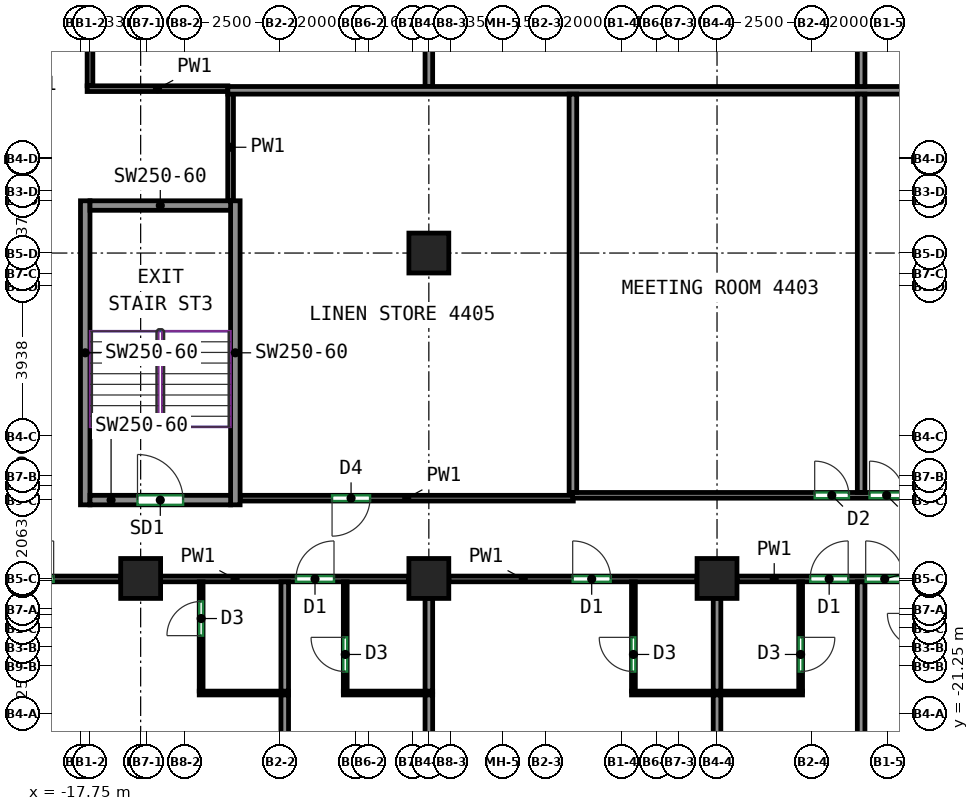
"""IFC4 building model, lengths in metres.
Left out: names, types, materials, properties, quantities, classifications, styles, units other than length and angle.
Written with IfcOpenShell. Run it as: python <this file> out.ifc"""

import sys

from ifc_helpers import new_model, si_unit, direction, frame, frame_2d, origin, origin_2d, place, context, subcontext, project, spatial, rectangle, extrude, source, transform, mapped, element, fill, save


model = new_model("IFC4")
c1 = context("Model", 3, precision=1e-05, world=origin(), true_north=direction((0.0, 1.0)))
c2 = subcontext(c1, "Body", "Model", "MODEL_VIEW")
j1 = project(units=[si_unit("LENGTHUNIT", "METRE"), si_unit("PLANEANGLEUNIT", "RADIAN")], contexts=[c1])
p1 = place(None, origin())
s1 = spatial("IfcSite", under=j1, at=p1, CompositionType="ELEMENT")
p2 = place(p1, origin())
s2 = spatial("IfcBuilding", under=s1, at=p2, CompositionType="ELEMENT")
p3 = place(p2, frame((0.0, 0.0, 185.5)))
s3 = spatial("IfcBuildingStorey", under=s2, at=p3, CompositionType="ELEMENT", Elevation=185.5)
m1 = source(origin(), c2, "Body", "SweptSolid", [
    extrude(rectangle(XDim=1.05, YDim=1.05, at=origin_2d()), origin(), (0.0, 0.0, 1.0), 3.12),
])
for number, where, z_axis, x_axis in (
    (1, (-16.167, -17.688, 0.0), (0.0, 0.0, 1.0), (1.0, 0.0, 0.0)),
    (2, (-8.583, -17.688, 0.0), (0.0, 0.0, 1.0), (1.0, 0.0, 0.0)),
    (3, (-8.583, -9.125, 0.0), (0.0, 0.0, 1.0), (1.0, 0.0, 0.0)),
    (4, (-1.0, -17.688, 0.0), (0.0, 0.0, 1.0), (1.0, 0.0, 0.0)),
):
    element("IfcColumn", number, at=place(p3, frame(where, z_axis=z_axis, x_axis=x_axis)), inside=s3, PredefinedType="COLUMN", context=c2, shape_type="MappedRepresentation", body=[
        mapped(m1, transform((0.0, 0.0, 0.0))),
    ])
m2 = source(origin(), c2, "Body", "SweptSolid", [
    extrude(rectangle(XDim=8.0, YDim=0.25, at=frame_2d((4.0, 0.0))), origin(), (0.0, 0.0, 1.0), 3.12),
])
for number, where, z_axis, x_axis in (
    (5, (-17.625, -15.75, 0.0), (0.0, 0.0, 1.0), (0.0, 1.0, 0.0)),
    (6, (-13.675, -15.75, 0.0), (0.0, 0.0, 1.0), (0.0, 1.0, 0.0)),
):
    element("IfcWall", number, at=place(p3, frame(where, z_axis=z_axis, x_axis=x_axis)), inside=s3, PredefinedType="SHEAR", context=c2, shape_type="MappedRepresentation", body=[
        mapped(m2, transform((0.0, 0.0, 0.0))),
    ])
m3 = source(origin(), c2, "Body", "SweptSolid", [
    extrude(rectangle(XDim=3.7, YDim=0.25, at=frame_2d((1.85, 0.0))), origin(), (0.0, 0.0, 1.0), 3.12),
])
p4 = place(p3, frame((-17.5, -15.625, 0.0), z_axis=(0.0, 0.0, 1.0), x_axis=(1.0, 0.0, 0.0)))
e7 = element("IfcWall", 7, at=p4, inside=s3, PredefinedType="SHEAR", context=c2, shape_type="MappedRepresentation", body=[
    mapped(m3, transform((0.0, 0.0, 0.0))),
])
p5 = place(p4, frame((1.25, 0.0, 0.0)))
e8 = element("IfcOpeningElement", 8, at=p5, cuts=e7, PredefinedType="OPENING", context=c2, shape_type="SweptSolid", body=[
    extrude(rectangle(XDim=1.2, YDim=2.1, at=frame_2d((0.6, 1.05))), frame((0.0, 0.135, 0.0), z_axis=(0.0, -1.0, 0.0), x_axis=(1.0, 0.0, 0.0)), (0.0, 0.0, 1.0), 0.27),
])
p6 = place(p3, frame((-17.5, -7.875, 0.0), z_axis=(0.0, 0.0, 1.0), x_axis=(1.0, 0.0, 0.0)))
e9 = element("IfcWall", 9, at=p6, inside=s3, PredefinedType="SHEAR", context=c2, shape_type="MappedRepresentation", body=[
    mapped(m3, transform((0.0, 0.0, 0.0))),
])
p7 = place(p3, frame((-23.75, -17.7, 0.0), z_axis=(0.0, 0.0, 1.0), x_axis=(1.0, 0.0, 0.0)))
e10 = element("IfcWall", 10, at=p7, inside=s3, PredefinedType="PARTITIONING", context=c2, shape_type="SweptSolid", body=[
    extrude(rectangle(XDim=7.058, YDim=0.15, at=frame_2d((3.529, 0.0))), origin(), (0.0, 0.0, 1.0), 2.52),
])
p8 = place(p7, frame((0.401, 0.0, 0.0)))
e11 = element("IfcOpeningElement", 11, at=p8, cuts=e10, PredefinedType="OPENING", context=c2, shape_type="SweptSolid", body=[
    extrude(rectangle(XDim=1.0, YDim=2.1, at=frame_2d((0.5, 1.05))), frame((0.0, 0.085, 0.0), z_axis=(0.0, -1.0, 0.0), x_axis=(1.0, 0.0, 0.0)), (0.0, 0.0, 1.0), 0.17),
])
p9 = place(p7, frame((4.294, 0.0, 0.0)))
e12 = element("IfcOpeningElement", 12, at=p9, cuts=e10, PredefinedType="OPENING", context=c2, shape_type="SweptSolid", body=[
    extrude(rectangle(XDim=1.0, YDim=2.1, at=frame_2d((0.5, 1.05))), frame((0.0, 0.085, 0.0), z_axis=(0.0, -1.0, 0.0), x_axis=(1.0, 0.0, 0.0)), (0.0, 0.0, 1.0), 0.17),
])
p10 = place(p3, frame((-15.642, -17.7, 0.0), z_axis=(0.0, 0.0, 1.0), x_axis=(1.0, 0.0, 0.0)))
e13 = element("IfcWall", 13, at=p10, inside=s3, PredefinedType="PARTITIONING", context=c2, shape_type="SweptSolid", body=[
    extrude(rectangle(XDim=6.534, YDim=0.15, at=frame_2d((3.267, 0.0))), origin(), (0.0, 0.0, 1.0), 3.12),
])
p11 = place(p10, frame((3.563, 0.0, 0.0)))
e14 = element("IfcOpeningElement", 14, at=p11, cuts=e13, PredefinedType="OPENING", context=c2, shape_type="SweptSolid", body=[
    extrude(rectangle(XDim=1.0, YDim=2.1, at=frame_2d((0.5, 1.05))), frame((0.0, 0.085, 0.0), z_axis=(0.0, -1.0, 0.0), x_axis=(1.0, 0.0, 0.0)), (0.0, 0.0, 1.0), 0.17),
])
p12 = place(p3, frame((-8.058, -17.7, 0.0), z_axis=(0.0, 0.0, 1.0), x_axis=(1.0, 0.0, 0.0)))
e15 = element("IfcWall", 15, at=p12, inside=s3, PredefinedType="PARTITIONING", context=c2, shape_type="SweptSolid", body=[
    extrude(rectangle(XDim=6.533, YDim=0.15, at=frame_2d((3.267, 0.0))), origin(), (0.0, 0.0, 1.0), 3.12),
])
p13 = place(p12, frame((3.26, 0.0, 0.0)))
e16 = element("IfcOpeningElement", 16, at=p13, cuts=e15, PredefinedType="OPENING", context=c2, shape_type="SweptSolid", body=[
    extrude(rectangle(XDim=1.0, YDim=2.1, at=frame_2d((0.5, 1.05))), frame((0.0, 0.085, 0.0), z_axis=(0.0, -1.0, 0.0), x_axis=(1.0, 0.0, 0.0)), (0.0, 0.0, 1.0), 0.17),
])
p14 = place(p3, frame((-0.475, -17.7, 0.0), z_axis=(0.0, 0.0, 1.0), x_axis=(1.0, 0.0, 0.0)))
e17 = element("IfcWall", 17, at=p14, inside=s3, PredefinedType="PARTITIONING", context=c2, shape_type="SweptSolid", body=[
    extrude(rectangle(XDim=6.533, YDim=0.15, at=frame_2d((3.267, 0.0))), origin(), (0.0, 0.0, 1.0), 3.12),
])
p15 = place(p14, frame((1.926, 0.0, 0.0)))
e18 = element("IfcOpeningElement", 18, at=p15, cuts=e17, PredefinedType="OPENING", context=c2, shape_type="SweptSolid", body=[
    extrude(rectangle(XDim=1.0, YDim=2.1, at=frame_2d((0.5, 1.05))), frame((0.0, 0.085, 0.0), z_axis=(0.0, -1.0, 0.0), x_axis=(1.0, 0.0, 0.0)), (0.0, 0.0, 1.0), 0.17),
])
p16 = place(p14, frame((3.387, 0.0, 0.0)))
e19 = element("IfcOpeningElement", 19, at=p16, cuts=e17, PredefinedType="OPENING", context=c2, shape_type="SweptSolid", body=[
    extrude(rectangle(XDim=1.0, YDim=2.1, at=frame_2d((0.5, 1.05))), frame((0.0, 0.085, 0.0), z_axis=(0.0, -1.0, 0.0), x_axis=(1.0, 0.0, 0.0)), (0.0, 0.0, 1.0), 0.17),
])
p17 = place(p3, frame((-17.5, -4.725, 0.0), z_axis=(0.0, 0.0, 1.0), x_axis=(0.0, 1.0, 0.0)))
e20 = element("IfcWall", 20, at=p17, inside=s3, PredefinedType="PARTITIONING", context=c2, shape_type="SweptSolid", body=[
    extrude(rectangle(XDim=8.35, YDim=0.15, at=frame_2d((4.175, 0.0))), origin(), (0.0, 0.0, 1.0), 3.12),
])
p18 = place(p3, frame((-17.575, -4.8, 0.0), z_axis=(0.0, 0.0, 1.0), x_axis=(1.0, 0.0, 0.0)))
e21 = element("IfcWall", 21, at=p18, inside=s3, PredefinedType="PARTITIONING", context=c2, shape_type="SweptSolid", body=[
    extrude(rectangle(XDim=3.702, YDim=0.15, at=frame_2d((1.851, 0.0))), origin(), (0.0, 0.0, 1.0), 3.12),
])
p19 = place(p3, frame((-13.8, -7.75, 0.0), z_axis=(0.0, 0.0, 1.0), x_axis=(0.0, 1.0, 0.0)))
e22 = element("IfcWall", 22, at=p19, inside=s3, PredefinedType="PARTITIONING", context=c2, shape_type="SweptSolid", body=[
    extrude(rectangle(XDim=2.817, YDim=0.15, at=frame_2d((1.408, 0.0))), origin(), (0.0, 0.0, 1.0), 3.12),
])
p20 = place(p3, frame((-4.782, -15.575, 0.0), z_axis=(0.0, 0.0, 1.0), x_axis=(-1.0, 0.0, 0.0)))
e23 = element("IfcWall", 23, at=p20, inside=s3, PredefinedType="PARTITIONING", context=c2, shape_type="SweptSolid", body=[
    extrude(rectangle(XDim=8.768, YDim=0.15, at=frame_2d((4.384, 0.0))), origin(), (0.0, 0.0, 1.0), 3.12),
])
p21 = place(p20, frame((5.348, 0.0, 0.0)))
e24 = element("IfcOpeningElement", 24, at=p21, cuts=e23, PredefinedType="OPENING", context=c2, shape_type="SweptSolid", body=[
    extrude(rectangle(XDim=1.0, YDim=2.1, at=frame_2d((0.5, 1.05))), frame((0.0, 0.085, 0.0), z_axis=(0.0, -1.0, 0.0), x_axis=(1.0, 0.0, 0.0)), (0.0, 0.0, 1.0), 0.17),
])
p22 = place(p3, frame((-4.802, -15.5, 0.0), z_axis=(0.0, 0.0, 1.0), x_axis=(1.0, 0.0, 0.0)))
e25 = element("IfcWall", 25, at=p22, inside=s3, PredefinedType="PARTITIONING", context=c2, shape_type="SweptSolid", body=[
    extrude(rectangle(XDim=21.077, YDim=0.15, at=frame_2d((10.539, 0.0))), origin(), (0.0, 0.0, 1.0), 3.12),
])
p23 = place(p22, frame((6.372, 0.0, 0.0)))
e26 = element("IfcOpeningElement", 26, at=p23, cuts=e25, PredefinedType="OPENING", context=c2, shape_type="SweptSolid", body=[
    extrude(rectangle(XDim=0.9, YDim=2.1, at=frame_2d((0.45, 1.05))), frame((0.0, 0.085, 0.0), z_axis=(0.0, -1.0, 0.0), x_axis=(1.0, 0.0, 0.0)), (0.0, 0.0, 1.0), 0.17),
])
p24 = place(p22, frame((7.815, 0.0, 0.0)))
e27 = element("IfcOpeningElement", 27, at=p24, cuts=e25, PredefinedType="OPENING", context=c2, shape_type="SweptSolid", body=[
    extrude(rectangle(XDim=0.9, YDim=2.1, at=frame_2d((0.45, 1.05))), frame((0.0, 0.085, 0.0), z_axis=(0.0, -1.0, 0.0), x_axis=(1.0, 0.0, 0.0)), (0.0, 0.0, 1.0), 0.17),
])
p25 = place(p3, frame((-14.575, -20.652, 0.0), z_axis=(0.0, 0.0, 1.0), x_axis=(0.0, 1.0, 0.0)))
e28 = element("IfcWall", 28, at=p25, inside=s3, PredefinedType="PARTITIONING", context=c2, shape_type="SweptSolid", body=[
    extrude(rectangle(XDim=2.875, YDim=0.1, at=frame_2d((1.438, 0.0))), origin(), (0.0, 0.0, 1.0), 3.12),
])
p26 = place(p25, frame((1.46, 0.0, 0.0)))
e29 = element("IfcOpeningElement", 29, at=p26, cuts=e28, PredefinedType="OPENING", context=c2, shape_type="SweptSolid", body=[
    extrude(rectangle(XDim=0.9, YDim=2.1, at=frame_2d((0.45, 1.05))), frame((0.0, 0.06, 0.0), z_axis=(0.0, -1.0, 0.0), x_axis=(1.0, 0.0, 0.0)), (0.0, 0.0, 1.0), 0.12),
])
p27 = place(p3, frame((-14.625, -20.702, 0.0), z_axis=(0.0, 0.0, 1.0), x_axis=(1.0, 0.0, 0.0)))
e30 = element("IfcWall", 30, at=p27, inside=s3, PredefinedType="PARTITIONING", context=c2, shape_type="SweptSolid", body=[
    extrude(rectangle(XDim=2.35, YDim=0.1, at=frame_2d((1.175, 0.0))), origin(), (0.0, 0.0, 1.0), 3.12),
])
p28 = place(p3, frame((-12.375, -26.0, 0.0), z_axis=(0.0, 0.0, 1.0), x_axis=(0.0, 1.0, 0.0)))
e31 = element("IfcWall", 31, at=p28, inside=s3, PredefinedType="PARTITIONING", context=c2, shape_type="SweptSolid", body=[
    extrude(rectangle(XDim=5.248, YDim=0.2, at=frame_2d((2.624, 0.0))), origin(), (0.0, 0.0, 1.0), 3.12),
])
p29 = place(p3, frame((-12.375, -20.652, 0.0), z_axis=(0.0, 0.0, 1.0), x_axis=(0.0, 1.0, 0.0)))
e32 = element("IfcWall", 32, at=p29, inside=s3, PredefinedType="PARTITIONING", context=c2, shape_type="SweptSolid", body=[
    extrude(rectangle(XDim=2.875, YDim=0.2, at=frame_2d((1.438, 0.0))), origin(), (0.0, 0.0, 1.0), 3.12),
])
p30 = place(p3, frame((-10.783, -20.652, 0.0), z_axis=(0.0, 0.0, 1.0), x_axis=(0.0, 1.0, 0.0)))
e33 = element("IfcWall", 33, at=p30, inside=s3, PredefinedType="PARTITIONING", context=c2, shape_type="SweptSolid", body=[
    extrude(rectangle(XDim=2.875, YDim=0.1, at=frame_2d((1.438, 0.0))), origin(), (0.0, 0.0, 1.0), 3.12),
])
p31 = place(p30, frame((0.515, 0.0, 0.0)))
e34 = element("IfcOpeningElement", 34, at=p31, cuts=e33, PredefinedType="OPENING", context=c2, shape_type="SweptSolid", body=[
    extrude(rectangle(XDim=0.9, YDim=2.1, at=frame_2d((0.45, 1.05))), frame((0.0, 0.06, 0.0), z_axis=(0.0, -1.0, 0.0), x_axis=(1.0, 0.0, 0.0)), (0.0, 0.0, 1.0), 0.12),
])
p32 = place(p3, frame((-10.833, -20.702, 0.0), z_axis=(0.0, 0.0, 1.0), x_axis=(1.0, 0.0, 0.0)))
e35 = element("IfcWall", 35, at=p32, inside=s3, PredefinedType="PARTITIONING", context=c2, shape_type="SweptSolid", body=[
    extrude(rectangle(XDim=2.35, YDim=0.1, at=frame_2d((1.175, 0.0))), origin(), (0.0, 0.0, 1.0), 3.12),
])
p33 = place(p3, frame((-8.583, -25.4, 0.0), z_axis=(0.0, 0.0, 1.0), x_axis=(0.0, 1.0, 0.0)))
e36 = element("IfcWall", 36, at=p33, inside=s3, PredefinedType="PARTITIONING", context=c2, shape_type="SweptSolid", body=[
    extrude(rectangle(XDim=4.648, YDim=0.2, at=frame_2d((2.324, 0.0))), origin(), (0.0, 0.0, 1.0), 3.12),
])
p34 = place(p3, frame((-8.583, -20.652, 0.0), z_axis=(0.0, 0.0, 1.0), x_axis=(0.0, 1.0, 0.0)))
e37 = element("IfcWall", 37, at=p34, inside=s3, PredefinedType="PARTITIONING", context=c2, shape_type="SweptSolid", body=[
    extrude(rectangle(XDim=2.44, YDim=0.2, at=frame_2d((1.22, 0.0))), origin(), (0.0, 0.0, 1.0), 3.12),
])
p35 = place(p3, frame((-3.2, -20.652, 0.0), z_axis=(0.0, 0.0, 1.0), x_axis=(0.0, 1.0, 0.0)))
e38 = element("IfcWall", 38, at=p35, inside=s3, PredefinedType="PARTITIONING", context=c2, shape_type="SweptSolid", body=[
    extrude(rectangle(XDim=2.875, YDim=0.1, at=frame_2d((1.438, 0.0))), origin(), (0.0, 0.0, 1.0), 3.12),
])
p36 = place(p35, frame((0.515, 0.0, 0.0)))
e39 = element("IfcOpeningElement", 39, at=p36, cuts=e38, PredefinedType="OPENING", context=c2, shape_type="SweptSolid", body=[
    extrude(rectangle(XDim=0.9, YDim=2.1, at=frame_2d((0.45, 1.05))), frame((0.0, 0.06, 0.0), z_axis=(0.0, -1.0, 0.0), x_axis=(1.0, 0.0, 0.0)), (0.0, 0.0, 1.0), 0.12),
])
p37 = place(p3, frame((-3.25, -20.702, 0.0), z_axis=(0.0, 0.0, 1.0), x_axis=(1.0, 0.0, 0.0)))
e40 = element("IfcWall", 40, at=p37, inside=s3, PredefinedType="PARTITIONING", context=c2, shape_type="SweptSolid", body=[
    extrude(rectangle(XDim=4.5, YDim=0.1, at=frame_2d((2.25, 0.0))), origin(), (0.0, 0.0, 1.0), 3.12),
])
p38 = place(p3, frame((-1.0, -25.4, 0.0), z_axis=(0.0, 0.0, 1.0), x_axis=(0.0, 1.0, 0.0)))
e41 = element("IfcWall", 41, at=p38, inside=s3, PredefinedType="PARTITIONING", context=c2, shape_type="SweptSolid", body=[
    extrude(rectangle(XDim=4.648, YDim=0.2, at=frame_2d((2.324, 0.0))), origin(), (0.0, 0.0, 1.0), 3.12),
])
p39 = place(p3, frame((-1.0, -20.652, 0.0), z_axis=(0.0, 0.0, 1.0), x_axis=(0.0, 1.0, 0.0)))
e42 = element("IfcWall", 42, at=p39, inside=s3, PredefinedType="PARTITIONING", context=c2, shape_type="SweptSolid", body=[
    extrude(rectangle(XDim=2.44, YDim=0.2, at=frame_2d((1.22, 0.0))), origin(), (0.0, 0.0, 1.0), 3.12),
])
p40 = place(p3, frame((1.2, -17.777, 0.0), z_axis=(0.0, 0.0, 1.0), x_axis=(0.0, -1.0, 0.0)))
e43 = element("IfcWall", 43, at=p40, inside=s3, PredefinedType="PARTITIONING", context=c2, shape_type="SweptSolid", body=[
    extrude(rectangle(XDim=2.875, YDim=0.1, at=frame_2d((1.438, 0.0))), origin(), (0.0, 0.0, 1.0), 3.12),
])
p41 = place(p40, frame((1.46, 0.0, 0.0)))
e44 = element("IfcOpeningElement", 44, at=p41, cuts=e43, PredefinedType="OPENING", context=c2, shape_type="SweptSolid", body=[
    extrude(rectangle(XDim=0.9, YDim=2.1, at=frame_2d((0.45, 1.05))), frame((0.0, 0.06, 0.0), z_axis=(0.0, -1.0, 0.0), x_axis=(1.0, 0.0, 0.0)), (0.0, 0.0, 1.0), 0.12),
])
p42 = place(p3, frame((2.792, -26.0, 0.0), z_axis=(0.0, 0.0, 1.0), x_axis=(0.0, 1.0, 0.0)))
e45 = element("IfcWall", 45, at=p42, inside=s3, PredefinedType="PARTITIONING", context=c2, shape_type="SweptSolid", body=[
    extrude(rectangle(XDim=8.223, YDim=0.2, at=frame_2d((4.111, 0.0))), origin(), (0.0, 0.0, 1.0), 3.12),
])
p43 = place(p3, frame((-8.583, -4.743, 0.0), z_axis=(0.0, 0.0, 1.0), x_axis=(0.0, 1.0, 0.0)))
e46 = element("IfcWall", 46, at=p43, inside=s3, PredefinedType="PARTITIONING", context=c2, shape_type="SweptSolid", body=[
    extrude(rectangle(XDim=3.656, YDim=0.2, at=frame_2d((1.828, 0.0))), origin(), (0.0, 0.0, 1.0), 2.52),
])
p44 = place(p3, frame((-13.873, -4.843, 0.0), z_axis=(0.0, 0.0, 1.0), x_axis=(1.0, 0.0, 0.0)))
e47 = element("IfcWall", 47, at=p44, inside=s3, PredefinedType="PARTITIONING", context=c2, shape_type="SweptSolid", body=[
    extrude(rectangle(XDim=30.146, YDim=0.2, at=frame_2d((15.073, 0.0))), origin(), (0.0, 0.0, 1.0), 3.12),
])
p45 = place(p3, frame((2.792, -4.743, 0.0), z_axis=(0.0, 0.0, 1.0), x_axis=(0.0, 1.0, 0.0)))
e48 = element("IfcWall", 48, at=p45, inside=s3, PredefinedType="PARTITIONING", context=c2, shape_type="SweptSolid", body=[
    extrude(rectangle(XDim=8.366, YDim=0.2, at=frame_2d((4.183, 0.0))), origin(), (0.0, 0.0, 1.0), 3.12),
])
for number, where, z_axis, x_axis in (
    (49, (-4.792, -15.423, 0.0), (0.0, 0.0, 1.0), (0.0, 1.0, 0.0)),
    (50, (2.792, -15.423, 0.0), (0.0, 0.0, 1.0), (0.0, 1.0, 0.0)),
):
    element("IfcWall", number, at=place(p3, frame(where, z_axis=z_axis, x_axis=x_axis)), inside=s3, PredefinedType="PARTITIONING", context=c2, shape_type="SweptSolid", body=[
        extrude(rectangle(XDim=10.48, YDim=0.2, at=frame_2d((5.24, 0.0))), origin(), (0.0, 0.0, 1.0), 3.12),
    ])
p46 = place(p5, origin())
e51 = element("IfcDoor", 51, at=p46, inside=s3, OperationType="DOUBLE_DOOR_SINGLE_SWING", PredefinedType="DOOR", context=c2, shape_type="SweptSolid", body=[
    extrude(rectangle(XDim=1.2, YDim=2.1, at=frame_2d((0.6, 1.05))), frame((0.0, 0.025, 0.0), z_axis=(0.0, -1.0, 0.0), x_axis=(1.0, 0.0, 0.0)), (0.0, 0.0, 1.0), 0.05),
])
fill(e8, e51)
p47 = place(p31, origin())
e52 = element("IfcDoor", 52, at=p47, inside=s3, OperationType="SINGLE_SWING_RIGHT", PredefinedType="DOOR", context=c2, shape_type="SweptSolid", body=[
    extrude(rectangle(XDim=0.9, YDim=2.1, at=frame_2d((0.45, 1.05))), frame((0.0, 0.025, 0.0), z_axis=(0.0, -1.0, 0.0), x_axis=(1.0, 0.0, 0.0)), (0.0, 0.0, 1.0), 0.05),
])
fill(e34, e52)
p48 = place(p36, origin())
e53 = element("IfcDoor", 53, at=p48, inside=s3, OperationType="SINGLE_SWING_RIGHT", PredefinedType="DOOR", context=c2, shape_type="SweptSolid", body=[
    extrude(rectangle(XDim=0.9, YDim=2.1, at=frame_2d((0.45, 1.05))), frame((0.0, 0.025, 0.0), z_axis=(0.0, -1.0, 0.0), x_axis=(1.0, 0.0, 0.0)), (0.0, 0.0, 1.0), 0.05),
])
fill(e39, e53)
p49 = place(p41, origin())
e54 = element("IfcDoor", 54, at=p49, inside=s3, OperationType="SINGLE_SWING_LEFT", PredefinedType="DOOR", context=c2, shape_type="SweptSolid", body=[
    extrude(rectangle(XDim=0.9, YDim=2.1, at=frame_2d((0.45, 1.05))), frame((0.0, 0.025, 0.0), z_axis=(0.0, -1.0, 0.0), x_axis=(1.0, 0.0, 0.0)), (0.0, 0.0, 1.0), 0.05),
])
fill(e44, e54)
p50 = place(p26, origin())
e55 = element("IfcDoor", 55, at=p50, inside=s3, OperationType="SINGLE_SWING_LEFT", PredefinedType="DOOR", context=c2, shape_type="SweptSolid", body=[
    extrude(rectangle(XDim=0.9, YDim=2.1, at=frame_2d((0.45, 1.05))), frame((0.0, 0.025, 0.0), z_axis=(0.0, -1.0, 0.0), x_axis=(1.0, 0.0, 0.0)), (0.0, 0.0, 1.0), 0.05),
])
fill(e29, e55)
p51 = place(p9, origin())
e56 = element("IfcDoor", 56, at=p51, inside=s3, OperationType="SINGLE_SWING_RIGHT", PredefinedType="DOOR", context=c2, shape_type="SweptSolid", body=[
    extrude(rectangle(XDim=1.0, YDim=2.1, at=frame_2d((0.5, 1.05))), frame((0.0, 0.025, 0.0), z_axis=(0.0, -1.0, 0.0), x_axis=(1.0, 0.0, 0.0)), (0.0, 0.0, 1.0), 0.05),
])
fill(e12, e56)
p52 = place(p11, origin())
e57 = element("IfcDoor", 57, at=p52, inside=s3, OperationType="SINGLE_SWING_RIGHT", PredefinedType="DOOR", context=c2, shape_type="SweptSolid", body=[
    extrude(rectangle(XDim=1.0, YDim=2.1, at=frame_2d((0.5, 1.05))), frame((0.0, 0.025, 0.0), z_axis=(0.0, -1.0, 0.0), x_axis=(1.0, 0.0, 0.0)), (0.0, 0.0, 1.0), 0.05),
])
fill(e14, e57)
p53 = place(p13, origin())
e58 = element("IfcDoor", 58, at=p53, inside=s3, OperationType="SINGLE_SWING_LEFT", PredefinedType="DOOR", context=c2, shape_type="SweptSolid", body=[
    extrude(rectangle(XDim=1.0, YDim=2.1, at=frame_2d((0.5, 1.05))), frame((0.0, 0.025, 0.0), z_axis=(0.0, -1.0, 0.0), x_axis=(1.0, 0.0, 0.0)), (0.0, 0.0, 1.0), 0.05),
])
fill(e16, e58)
p54 = place(p15, origin())
e59 = element("IfcDoor", 59, at=p54, inside=s3, OperationType="SINGLE_SWING_RIGHT", PredefinedType="DOOR", context=c2, shape_type="SweptSolid", body=[
    extrude(rectangle(XDim=1.0, YDim=2.1, at=frame_2d((0.5, 1.05))), frame((0.0, 0.025, 0.0), z_axis=(0.0, -1.0, 0.0), x_axis=(1.0, 0.0, 0.0)), (0.0, 0.0, 1.0), 0.05),
])
fill(e18, e59)
p55 = place(p16, origin())
e60 = element("IfcDoor", 60, at=p55, inside=s3, OperationType="SINGLE_SWING_LEFT", PredefinedType="DOOR", context=c2, shape_type="SweptSolid", body=[
    extrude(rectangle(XDim=1.0, YDim=2.1, at=frame_2d((0.5, 1.05))), frame((0.0, 0.025, 0.0), z_axis=(0.0, -1.0, 0.0), x_axis=(1.0, 0.0, 0.0)), (0.0, 0.0, 1.0), 0.05),
])
fill(e19, e60)
p56 = place(p21, origin())
e61 = element("IfcDoor", 61, at=p56, inside=s3, OperationType="SINGLE_SWING_RIGHT", PredefinedType="DOOR", context=c2, shape_type="SweptSolid", body=[
    extrude(rectangle(XDim=1.0, YDim=2.1, at=frame_2d((0.5, 1.05))), frame((0.0, 0.025, 0.0), z_axis=(0.0, -1.0, 0.0), x_axis=(1.0, 0.0, 0.0)), (0.0, 0.0, 1.0), 0.05),
])
fill(e24, e61)
p57 = place(p23, origin())
e62 = element("IfcDoor", 62, at=p57, inside=s3, OperationType="SINGLE_SWING_LEFT", PredefinedType="DOOR", context=c2, shape_type="SweptSolid", body=[
    extrude(rectangle(XDim=0.9, YDim=2.1, at=frame_2d((0.45, 1.05))), frame((0.0, 0.025, 0.0), z_axis=(0.0, -1.0, 0.0), x_axis=(1.0, 0.0, 0.0)), (0.0, 0.0, 1.0), 0.05),
])
fill(e26, e62)
p58 = place(p24, origin())
e63 = element("IfcDoor", 63, at=p58, inside=s3, OperationType="SINGLE_SWING_LEFT", PredefinedType="DOOR", context=c2, shape_type="SweptSolid", body=[
    extrude(rectangle(XDim=0.9, YDim=2.1, at=frame_2d((0.45, 1.05))), frame((0.0, 0.025, 0.0), z_axis=(0.0, -1.0, 0.0), x_axis=(1.0, 0.0, 0.0)), (0.0, 0.0, 1.0), 0.05),
])
fill(e27, e63)
save(model, sys.argv[1])
